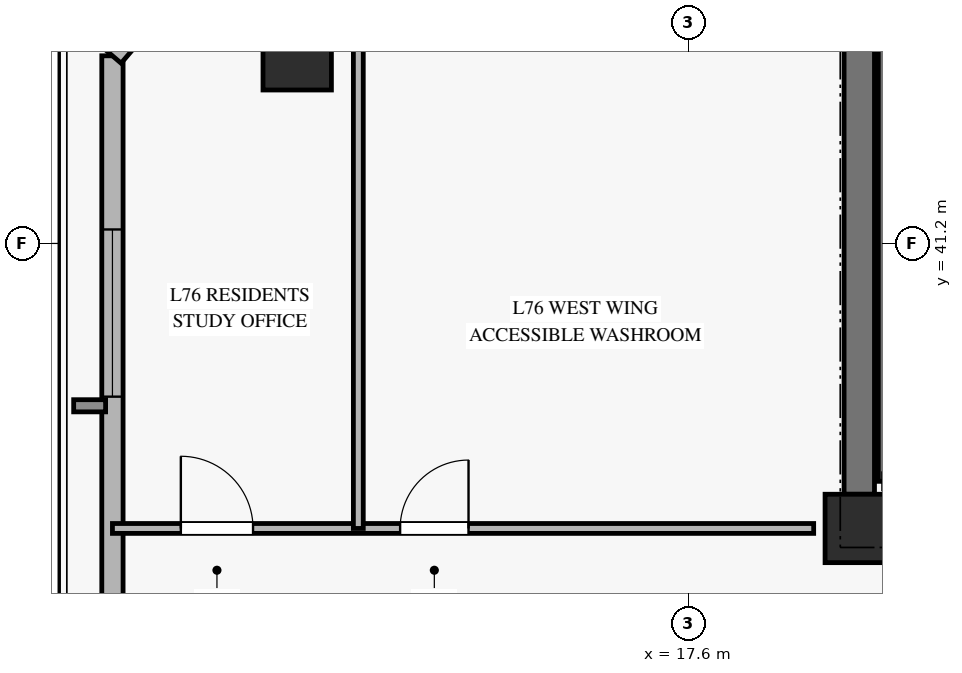
"""IFC4 building model, lengths in metres.
Left out: names, types, materials, properties, quantities, classifications, styles, units other than length and angle.
Written with IfcOpenShell. Run it as: python <this file> out.ifc"""

import sys

from ifc_helpers import new_model, si_unit, direction, frame, frame_2d, origin, origin_2d, place, context, subcontext, project, spatial, rectangle, hollow_rectangle, extrude, source, transform, mapped, element, fill, save


model = new_model("IFC4")
c1 = context("Model", 3, precision=1e-05, world=origin(), true_north=direction((0.0, 1.0)))
c2 = subcontext(c1, "Body", "Model", "MODEL_VIEW")
j1 = project(units=[si_unit("LENGTHUNIT", "METRE"), si_unit("PLANEANGLEUNIT", "RADIAN")], contexts=[c1])
p1 = place(None, origin())
s1 = spatial("IfcSite", under=j1, at=p1, CompositionType="ELEMENT")
p2 = place(p1, origin())
s2 = spatial("IfcBuilding", under=s1, at=p2, CompositionType="ELEMENT")
p3 = place(p2, frame((0.0, 0.0, 297.2)))
s3 = spatial("IfcBuildingStorey", under=s2, at=p3, CompositionType="ELEMENT", Elevation=297.2)
m1 = source(origin(), c2, "Body", "SweptSolid", [
    extrude(rectangle(XDim=0.9, YDim=0.9, at=origin_2d()), origin(), (0.0, 0.0, 1.0), 3.185),
])
p4 = place(p3, frame((19.85, 37.45, 0.0), z_axis=(0.0, 0.0, 1.0), x_axis=(1.0, 0.0, 0.0)))
e1 = element("IfcColumn", 1, at=p4, inside=s3, PredefinedType="PILASTER", context=c2, shape_type="MappedRepresentation", body=[
    mapped(m1, transform((0.0, 0.0, 0.0), x_axis=(1.0, 0.0, 0.0), y_axis=(0.0, 1.0, 0.0), z_axis=(0.0, 0.0, 1.0), scale=1.0)),
])
p5 = place(p3, frame((19.85, 37.9, 0.0), z_axis=(0.0, 0.0, 1.0), x_axis=(0.0, 1.0, 0.0)))
e2 = element("IfcWall", 2, at=p5, inside=s3, PredefinedType="SHEAR", context=c2, shape_type="SweptSolid", body=[
    extrude(rectangle(XDim=8.2, YDim=0.4, at=frame_2d((4.1, 0.0))), origin(), (0.0, 0.0, 1.0), 3.185),
])
m2 = source(origin(), c2, "Body", "SweptSolid", [
    extrude(hollow_rectangle(XDim=0.9, YDim=0.9, WallThickness=0.04, at=origin_2d()), origin(), (0.0, 0.0, 1.0), 3.185),
])
p6 = place(p3, frame((12.455, 43.669, 0.0), z_axis=(0.0, 0.0, 1.0), x_axis=(1.0, 0.0, 0.0)))
e3 = element("IfcColumn", 3, at=p6, inside=s3, PredefinedType="COLUMN", context=c2, shape_type="MappedRepresentation", body=[
    mapped(m2, transform((0.0, 0.0, 0.0), x_axis=(1.0, 0.0, 0.0), y_axis=(0.0, 1.0, 0.0), z_axis=(0.0, 0.0, 1.0), scale=1.0)),
])
p7 = place(p3, frame((10.024, 32.696, 0.0), z_axis=(0.0, 0.0, 1.0), x_axis=(0.0, 1.0, 0.0)))
e4 = element("IfcWall", 4, at=p7, inside=s3, PredefinedType="SOLIDWALL", context=c2, shape_type="SweptSolid", body=[
    extrude(rectangle(XDim=10.973, YDim=0.28, at=frame_2d((5.486, 0.0))), origin(), (0.0, 0.0, 1.0), 2.815),
])
p8 = place(p7, frame((6.488, 0.0, 0.45)))
e5 = element("IfcOpeningElement", 5, at=p8, cuts=e4, PredefinedType="OPENING", context=c2, shape_type="SweptSolid", body=[
    extrude(rectangle(XDim=2.2, YDim=2.1, at=frame_2d((1.1, 1.05))), frame((0.0, 0.15, 0.0), z_axis=(0.0, -1.0, 0.0), x_axis=(1.0, 0.0, 0.0)), (0.0, 0.0, 1.0), 0.3),
])
p9 = place(p3, frame((12.23, 46.25, 0.0), z_axis=(0.0, 0.0, 1.0), x_axis=(-0.649724860602, -0.76016945842, 0.0)))
e6 = element("IfcWall", 6, at=p9, inside=s3, PredefinedType="SOLIDWALL", context=c2, shape_type="SweptSolid", body=[
    extrude(rectangle(XDim=3.395, YDim=0.3, at=frame_2d((1.698, 0.0))), origin(), (0.0, 0.0, 1.0), 2.815),
])
p10 = place(p9, frame((0.898, 0.0, 0.45)))
e7 = element("IfcOpeningElement", 7, at=p10, cuts=e6, PredefinedType="OPENING", context=c2, shape_type="SweptSolid", body=[
    extrude(rectangle(XDim=1.6, YDim=2.0, at=frame_2d((0.8, 1.0))), frame((0.0, 0.16, 0.0), z_axis=(0.0, -1.0, 0.0), x_axis=(1.0, 0.0, 0.0)), (0.0, 0.0, 1.0), 0.32),
])
p11 = place(p3, frame((20.17, 38.07, 0.0), z_axis=(0.0, 0.0, 1.0), x_axis=(0.0, 1.0, 0.0)))
e8 = element("IfcWall", 8, at=p11, inside=s3, PredefinedType="SOLIDWALL", context=c2, shape_type="SweptSolid", body=[
    extrude(rectangle(XDim=7.25, YDim=0.14, at=frame_2d((3.625, 0.0))), origin(), (0.0, 0.0, 1.0), 3.4),
])
p12 = place(p3, frame((10.024, 37.45, 0.0), z_axis=(0.0, 0.0, 1.0), x_axis=(1.0, 0.0, 0.0)))
e9 = element("IfcWall", 9, at=p12, inside=s3, PredefinedType="PARTITIONING", context=c2, shape_type="SweptSolid", body=[
    extrude(rectangle(XDim=9.226, YDim=0.13, at=frame_2d((4.613, 0.0))), origin(), (0.0, 0.0, 1.0), 2.82),
])
p13 = place(p12, frame((0.9, 0.0, 0.0)))
e10 = element("IfcOpeningElement", 10, at=p13, cuts=e9, PredefinedType="OPENING", context=c2, shape_type="SweptSolid", body=[
    extrude(rectangle(XDim=0.95, YDim=2.1, at=frame_2d((0.475, 1.05))), frame((0.0, 0.075, 0.0), z_axis=(0.0, -1.0, 0.0), x_axis=(1.0, 0.0, 0.0)), (0.0, 0.0, 1.0), 0.15),
])
p14 = place(p12, frame((3.785, 0.0, 0.0)))
e11 = element("IfcOpeningElement", 11, at=p14, cuts=e9, PredefinedType="OPENING", context=c2, shape_type="SweptSolid", body=[
    extrude(rectangle(XDim=0.9, YDim=2.1, at=frame_2d((0.45, 1.05))), frame((0.0, 0.075, 0.0), z_axis=(0.0, -1.0, 0.0), x_axis=(1.0, 0.0, 0.0)), (0.0, 0.0, 1.0), 0.15),
])
p15 = place(p3, frame((13.259, 37.45, 0.0), z_axis=(0.0, 0.0, 1.0), x_axis=(0.0, 1.0, 0.0)))
e12 = element("IfcWall", 12, at=p15, inside=s3, PredefinedType="PARTITIONING", context=c2, shape_type="SweptSolid", body=[
    extrude(rectangle(XDim=8.8, YDim=0.13, at=frame_2d((4.4, 0.0))), origin(), (0.0, 0.0, 1.0), 3.185),
])
m3 = source(origin(), c2, "Body", "SweptSolid", [
    extrude(rectangle(XDim=2.2, YDim=2.1, at=frame_2d((1.1, 1.05))), frame((0.0, 0.03, 0.0), z_axis=(0.0, -1.0, 0.0), x_axis=(1.0, 0.0, 0.0)), (0.0, 0.0, 1.0), 0.06),
])
p16 = place(p8, origin())
e13 = element("IfcWindow", 13, at=p16, inside=s3, PartitioningType="SINGLE_PANEL", PredefinedType="WINDOW", context=c2, shape_type="MappedRepresentation", body=[
    mapped(m3, transform((0.0, 0.0, 0.0), x_axis=(1.0, 0.0, 0.0), y_axis=(0.0, 1.0, 0.0), z_axis=(0.0, 0.0, 1.0), scale=1.0)),
])
fill(e5, e13)
m4 = source(origin(), c2, "Body", "SweptSolid", [
    extrude(rectangle(XDim=0.95, YDim=2.1, at=frame_2d((0.475, 1.05))), frame((0.0, 0.025, 0.0), z_axis=(0.0, -1.0, 0.0), x_axis=(1.0, 0.0, 0.0)), (0.0, 0.0, 1.0), 0.05),
])
p17 = place(p13, origin())
e14 = element("IfcDoor", 14, at=p17, inside=s3, OperationType="SINGLE_SWING_LEFT", PredefinedType="DOOR", context=c2, shape_type="MappedRepresentation", body=[
    mapped(m4, transform((0.0, 0.0, 0.0), x_axis=(1.0, 0.0, 0.0), y_axis=(0.0, 1.0, 0.0), z_axis=(0.0, 0.0, 1.0), scale=1.0)),
])
fill(e10, e14)
m5 = source(origin(), c2, "Body", "SweptSolid", [
    extrude(rectangle(XDim=0.9, YDim=2.1, at=frame_2d((0.45, 1.05))), frame((0.0, 0.025, 0.0), z_axis=(0.0, -1.0, 0.0), x_axis=(1.0, 0.0, 0.0)), (0.0, 0.0, 1.0), 0.05),
])
p18 = place(p14, origin())
e15 = element("IfcDoor", 15, at=p18, inside=s3, OperationType="SINGLE_SWING_RIGHT", PredefinedType="DOOR", context=c2, shape_type="MappedRepresentation", body=[
    mapped(m5, transform((0.0, 0.0, 0.0), x_axis=(1.0, 0.0, 0.0), y_axis=(0.0, 1.0, 0.0), z_axis=(0.0, 0.0, 1.0), scale=1.0)),
])
fill(e11, e15)
save(model, sys.argv[1])
